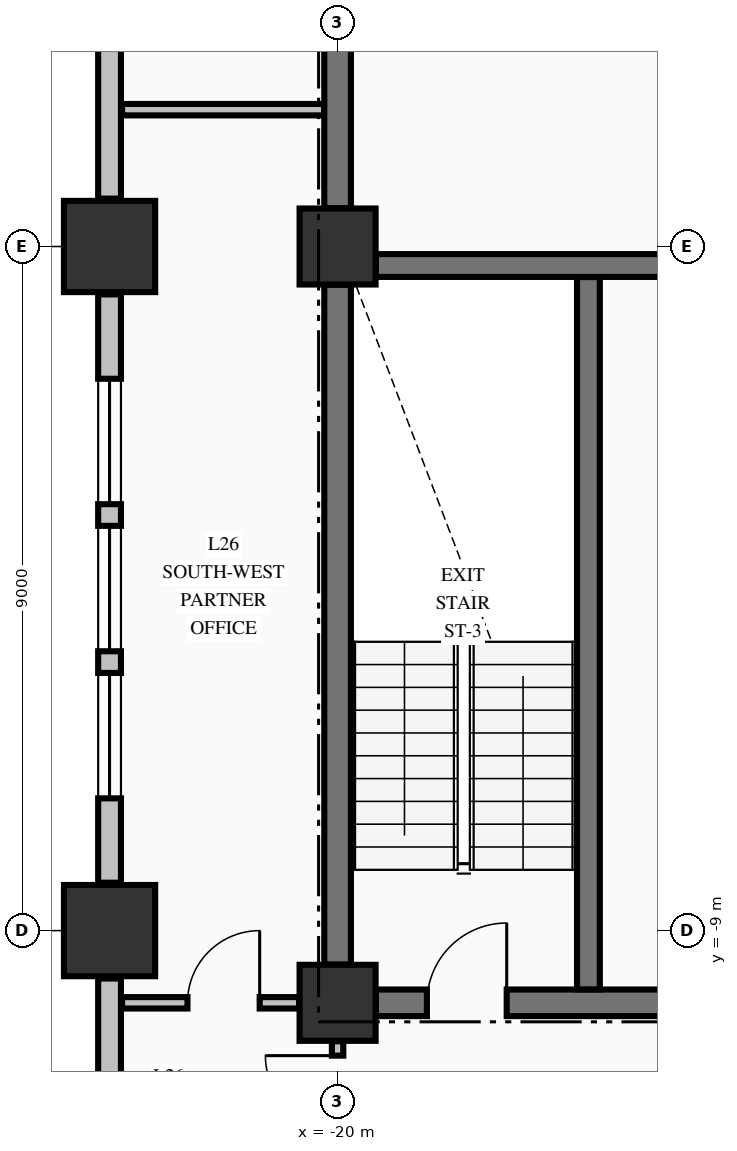
"""IFC4 building model, lengths in metres.
Left out: names, types, materials, properties, quantities, classifications, styles, units other than length and angle.
Written with IfcOpenShell. Run it as: python <this file> out.ifc"""

import sys

from ifc_helpers import new_model, si_unit, direction, frame, frame_2d, origin, origin_2d, place, context, subcontext, project, spatial, rectangle, extrude, element, fill, save


model = new_model("IFC4")
c1 = context("Model", 3, precision=1e-05, world=origin(), true_north=direction((0.0, 1.0)))
c2 = subcontext(c1, "Body", "Model", "MODEL_VIEW")
j1 = project(units=[si_unit("LENGTHUNIT", "METRE"), si_unit("PLANEANGLEUNIT", "RADIAN")], contexts=[c1])
p1 = place(None, origin())
s1 = spatial("IfcSite", under=j1, at=p1, CompositionType="ELEMENT")
p2 = place(p1, origin())
s2 = spatial("IfcBuilding", under=s1, at=p2, CompositionType="ELEMENT")
p3 = place(p2, frame((0.0, 0.0, 105.64)))
s3 = spatial("IfcBuildingStorey", under=s2, at=p3, CompositionType="ELEMENT", Elevation=105.64)
for number, where, z_axis, x_axis in (
    (1, (-23.0, -9.0, -0.25), (0.0, 0.0, 1.0), (1.0, 0.0, 0.0)),
    (2, (-23.0, 0.0, -0.25), (0.0, 0.0, 1.0), (1.0, 0.0, 0.0)),
):
    element("IfcColumn", number, at=place(p3, frame(where, z_axis=z_axis, x_axis=x_axis)), inside=s3, PredefinedType="COLUMN", context=c2, shape_type="SweptSolid", body=[
        extrude(rectangle(XDim=1.2, YDim=1.2, at=origin_2d()), origin(), (0.0, 0.0, 1.0), 3.57),
    ])
for number, where, z_axis, x_axis in (
    (3, (-20.0, -9.95, -0.25), (0.0, 0.0, 1.0), (1.0, 0.0, 0.0)),
    (4, (-20.0, 0.0, -0.25), (0.0, 0.0, 1.0), (1.0, 0.0, 0.0)),
):
    element("IfcColumn", number, at=place(p3, frame(where, z_axis=z_axis, x_axis=x_axis)), inside=s3, PredefinedType="COLUMN", context=c2, shape_type="SweptSolid", body=[
        extrude(rectangle(XDim=1.0, YDim=1.0, at=origin_2d()), origin(), (0.0, 0.0, 1.0), 3.57),
    ])
p4 = place(p3, frame((-23.0, -9.63, 0.0), z_axis=(0.0, 0.0, 1.0), x_axis=(0.0, -1.0, 0.0)))
e5 = element("IfcWall", 5, at=p4, inside=s3, PredefinedType="STANDARD", context=c2, shape_type="SweptSolid", body=[
    extrude(rectangle(XDim=10.74, YDim=0.3, at=frame_2d((5.37, 0.0))), origin(), (0.0, 0.0, 1.0), 2.712),
])
p5 = place(p3, frame((-23.0, -0.63, 0.0), z_axis=(0.0, 0.0, 1.0), x_axis=(0.0, -1.0, 0.0)))
e6 = element("IfcWall", 6, at=p5, inside=s3, PredefinedType="STANDARD", context=c2, shape_type="SweptSolid", body=[
    extrude(rectangle(XDim=7.74, YDim=0.3, at=frame_2d((3.87, 0.0))), origin(), (0.0, 0.0, 1.0), 2.712),
])
p6 = place(p5, frame((1.11, 0.0, 0.8)))
e7 = element("IfcOpeningElement", 7, at=p6, cuts=e6, PredefinedType="OPENING", context=c2, shape_type="SweptSolid", body=[
    extrude(rectangle(XDim=1.65, YDim=1.7, at=frame_2d((0.825, 0.85))), frame((0.0, 0.16, 0.0), z_axis=(0.0, -1.0, 0.0), x_axis=(1.0, 0.0, 0.0)), (0.0, 0.0, 1.0), 0.32),
])
p7 = place(p5, frame((3.045, 0.0, 0.8)))
e8 = element("IfcOpeningElement", 8, at=p7, cuts=e6, PredefinedType="OPENING", context=c2, shape_type="SweptSolid", body=[
    extrude(rectangle(XDim=1.65, YDim=1.7, at=frame_2d((0.825, 0.85))), frame((0.0, 0.16, 0.0), z_axis=(0.0, -1.0, 0.0), x_axis=(1.0, 0.0, 0.0)), (0.0, 0.0, 1.0), 0.32),
])
p8 = place(p5, frame((4.98, 0.0, 0.8)))
e9 = element("IfcOpeningElement", 9, at=p8, cuts=e6, PredefinedType="OPENING", context=c2, shape_type="SweptSolid", body=[
    extrude(rectangle(XDim=1.65, YDim=1.7, at=frame_2d((0.825, 0.85))), frame((0.0, 0.16, 0.0), z_axis=(0.0, -1.0, 0.0), x_axis=(1.0, 0.0, 0.0)), (0.0, 0.0, 1.0), 0.32),
])
p9 = place(p3, frame((-23.0, 8.37, 0.0), z_axis=(0.0, 0.0, 1.0), x_axis=(0.0, -1.0, 0.0)))
e10 = element("IfcWall", 10, at=p9, inside=s3, PredefinedType="STANDARD", context=c2, shape_type="SweptSolid", body=[
    extrude(rectangle(XDim=7.74, YDim=0.3, at=frame_2d((3.87, 0.0))), origin(), (0.0, 0.0, 1.0), 2.712),
])
p10 = place(p9, frame((1.11, 0.0, 0.8)))
e11 = element("IfcOpeningElement", 11, at=p10, cuts=e10, PredefinedType="OPENING", context=c2, shape_type="SweptSolid", body=[
    extrude(rectangle(XDim=1.65, YDim=1.7, at=frame_2d((0.825, 0.85))), frame((0.0, 0.16, 0.0), z_axis=(0.0, -1.0, 0.0), x_axis=(1.0, 0.0, 0.0)), (0.0, 0.0, 1.0), 0.32),
])
p11 = place(p9, frame((3.045, 0.0, 0.8)))
e12 = element("IfcOpeningElement", 12, at=p11, cuts=e10, PredefinedType="OPENING", context=c2, shape_type="SweptSolid", body=[
    extrude(rectangle(XDim=1.65, YDim=1.7, at=frame_2d((0.825, 0.85))), frame((0.0, 0.16, 0.0), z_axis=(0.0, -1.0, 0.0), x_axis=(1.0, 0.0, 0.0)), (0.0, 0.0, 1.0), 0.32),
])
p12 = place(p3, frame((-19.496, -9.95, 0.0), z_axis=(0.0, 0.0, 1.0), x_axis=(1.0, 0.0, 0.0)))
e13 = element("IfcWall", 13, at=p12, inside=s3, PredefinedType="SHEAR", context=c2, shape_type="SweptSolid", body=[
    extrude(rectangle(XDim=4.796, YDim=0.35, at=frame_2d((2.398, 0.0))), origin(), (0.0, 0.0, 1.0), 3.32),
])
p13 = place(p12, frame((0.671, 0.0, 0.0)))
e14 = element("IfcOpeningElement", 14, at=p13, cuts=e13, PredefinedType="OPENING", context=c2, shape_type="SweptSolid", body=[
    extrude(rectangle(XDim=1.05, YDim=2.15, at=frame_2d((0.525, 1.075))), frame((0.0, 0.185, 0.0), z_axis=(0.0, -1.0, 0.0), x_axis=(1.0, 0.0, 0.0)), (0.0, 0.0, 1.0), 0.37),
])
p14 = place(p3, frame((-19.496, -0.25, 0.0), z_axis=(0.0, 0.0, 1.0), x_axis=(1.0, 0.0, 0.0)))
e15 = element("IfcWall", 15, at=p14, inside=s3, PredefinedType="SHEAR", context=c2, shape_type="SweptSolid", body=[
    extrude(rectangle(XDim=7.992, YDim=0.3, at=frame_2d((3.996, 0.0))), origin(), (0.0, 0.0, 1.0), 3.32),
])
p15 = place(p14, frame((5.796, 0.0, 0.0)))
e16 = element("IfcOpeningElement", 16, at=p15, cuts=e15, PredefinedType="OPENING", context=c2, shape_type="SweptSolid", body=[
    extrude(rectangle(XDim=1.1, YDim=2.15, at=frame_2d((0.55, 1.075))), frame((0.0, 0.16, 0.0), z_axis=(0.0, -1.0, 0.0), x_axis=(1.0, 0.0, 0.0)), (0.0, 0.0, 1.0), 0.32),
])
p16 = place(p3, frame((-22.835, -9.95, 0.0), z_axis=(0.0, 0.0, 1.0), x_axis=(1.0, 0.0, 0.0)))
e17 = element("IfcWall", 17, at=p16, inside=s3, PredefinedType="PARTITIONING", context=c2, shape_type="SweptSolid", body=[
    extrude(rectangle(XDim=2.329, YDim=0.15, at=frame_2d((1.165, 0.0))), origin(), (0.0, 0.0, 1.0), 3.32),
])
p17 = place(p16, frame((0.86, 0.0, 0.0)))
e18 = element("IfcOpeningElement", 18, at=p17, cuts=e17, PredefinedType="OPENING", context=c2, shape_type="SweptSolid", body=[
    extrude(rectangle(XDim=0.95, YDim=2.15, at=frame_2d((0.475, 1.075))), frame((0.0, 0.085, 0.0), z_axis=(0.0, -1.0, 0.0), x_axis=(1.0, 0.0, 0.0)), (0.0, 0.0, 1.0), 0.17),
])
p18 = place(p3, frame((-22.835, 1.8, 0.0), z_axis=(0.0, 0.0, 1.0), x_axis=(1.0, 0.0, 0.0)))
e19 = element("IfcWall", 19, at=p18, inside=s3, PredefinedType="PARTITIONING", context=c2, shape_type="SweptSolid", body=[
    extrude(rectangle(XDim=2.657, YDim=0.15, at=frame_2d((1.329, 0.0))), origin(), (0.0, 0.0, 1.0), 3.32),
])
p19 = place(p3, frame((-20.0, -9.446, 0.0), z_axis=(0.0, 0.0, 1.0), x_axis=(0.0, 1.0, 0.0)))
e20 = element("IfcWall", 20, at=p19, inside=s3, PredefinedType="SHEAR", context=c2, shape_type="SweptSolid", body=[
    extrude(rectangle(XDim=8.942, YDim=0.35, at=frame_2d((4.471, 0.0))), origin(), (0.0, 0.0, 1.0), 3.32),
])
p20 = place(p3, frame((-20.0, 0.504, 0.0), z_axis=(0.0, 0.0, 1.0), x_axis=(0.0, 1.0, 0.0)))
e21 = element("IfcWall", 21, at=p20, inside=s3, PredefinedType="SHEAR", context=c2, shape_type="SweptSolid", body=[
    extrude(rectangle(XDim=9.492, YDim=0.35, at=frame_2d((4.746, 0.0))), origin(), (0.0, 0.0, 1.0), 3.32),
])
p21 = place(p3, frame((-16.7, -9.773, 0.0), z_axis=(0.0, 0.0, 1.0), x_axis=(0.0, 1.0, 0.0)))
e22 = element("IfcWall", 22, at=p21, inside=s3, PredefinedType="SHEAR", context=c2, shape_type="SweptSolid", body=[
    extrude(rectangle(XDim=9.371, YDim=0.3, at=frame_2d((4.686, 0.0))), origin(), (0.0, 0.0, 1.0), 3.32),
])
p22 = place(p3, frame((-20.0, -12.222, 0.0), z_axis=(0.0, 0.0, 1.0), x_axis=(0.0, 1.0, 0.0)))
e23 = element("IfcWall", 23, at=p22, inside=s3, PredefinedType="PARTITIONING", context=c2, shape_type="SweptSolid", body=[
    extrude(rectangle(XDim=1.766, YDim=0.15, at=frame_2d((0.883, 0.0))), origin(), (0.0, 0.0, 1.0), 2.81),
])
p23 = place(p22, frame((0.627, 0.0, 0.0)))
e24 = element("IfcOpeningElement", 24, at=p23, cuts=e23, PredefinedType="OPENING", context=c2, shape_type="SweptSolid", body=[
    extrude(rectangle(XDim=0.95, YDim=2.15, at=frame_2d((0.475, 1.075))), frame((0.0, 0.085, 0.0), z_axis=(0.0, -1.0, 0.0), x_axis=(1.0, 0.0, 0.0)), (0.0, 0.0, 1.0), 0.17),
])
p24 = place(p6, origin())
e25 = element("IfcWindow", 25, at=p24, inside=s3, PartitioningType="SINGLE_PANEL", PredefinedType="WINDOW", context=c2, shape_type="SweptSolid", body=[
    extrude(rectangle(XDim=1.65, YDim=1.7, at=frame_2d((0.825, 0.85))), frame((0.0, 0.03, 0.0), z_axis=(0.0, -1.0, 0.0), x_axis=(1.0, 0.0, 0.0)), (0.0, 0.0, 1.0), 0.06),
])
fill(e7, e25)
p25 = place(p7, origin())
e26 = element("IfcWindow", 26, at=p25, inside=s3, PartitioningType="SINGLE_PANEL", PredefinedType="WINDOW", context=c2, shape_type="SweptSolid", body=[
    extrude(rectangle(XDim=1.65, YDim=1.7, at=frame_2d((0.825, 0.85))), frame((0.0, 0.03, 0.0), z_axis=(0.0, -1.0, 0.0), x_axis=(1.0, 0.0, 0.0)), (0.0, 0.0, 1.0), 0.06),
])
fill(e8, e26)
p26 = place(p8, origin())
e27 = element("IfcWindow", 27, at=p26, inside=s3, PartitioningType="SINGLE_PANEL", PredefinedType="WINDOW", context=c2, shape_type="SweptSolid", body=[
    extrude(rectangle(XDim=1.65, YDim=1.7, at=frame_2d((0.825, 0.85))), frame((0.0, 0.03, 0.0), z_axis=(0.0, -1.0, 0.0), x_axis=(1.0, 0.0, 0.0)), (0.0, 0.0, 1.0), 0.06),
])
fill(e9, e27)
p27 = place(p13, origin())
e28 = element("IfcDoor", 28, at=p27, inside=s3, OperationType="SINGLE_SWING_RIGHT", PredefinedType="DOOR", context=c2, shape_type="SweptSolid", body=[
    extrude(rectangle(XDim=1.05, YDim=2.15, at=frame_2d((0.525, 1.075))), frame((0.0, 0.025, 0.0), z_axis=(0.0, -1.0, 0.0), x_axis=(1.0, 0.0, 0.0)), (0.0, 0.0, 1.0), 0.05),
])
fill(e14, e28)
p28 = place(p23, origin())
e29 = element("IfcDoor", 29, at=p28, inside=s3, OperationType="SINGLE_SWING_RIGHT", PredefinedType="DOOR", context=c2, shape_type="SweptSolid", body=[
    extrude(rectangle(XDim=0.95, YDim=2.15, at=frame_2d((0.475, 1.075))), frame((0.0, 0.025, 0.0), z_axis=(0.0, -1.0, 0.0), x_axis=(1.0, 0.0, 0.0)), (0.0, 0.0, 1.0), 0.05),
])
fill(e24, e29)
p29 = place(p17, origin())
e30 = element("IfcDoor", 30, at=p29, inside=s3, OperationType="SINGLE_SWING_RIGHT", PredefinedType="DOOR", context=c2, shape_type="SweptSolid", body=[
    extrude(rectangle(XDim=0.95, YDim=2.15, at=frame_2d((0.475, 1.075))), frame((0.0, 0.025, 0.0), z_axis=(0.0, -1.0, 0.0), x_axis=(1.0, 0.0, 0.0)), (0.0, 0.0, 1.0), 0.05),
])
fill(e18, e30)
save(model, sys.argv[1])
